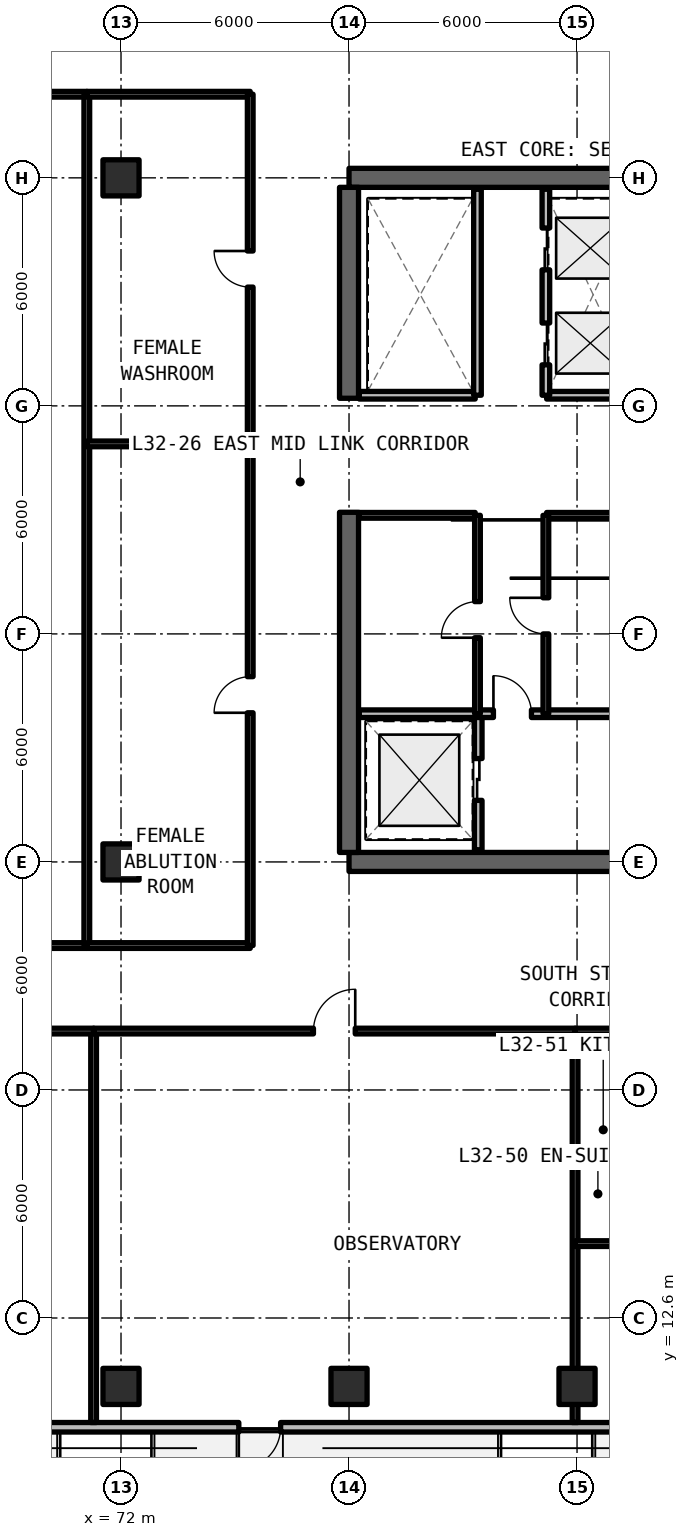
"""IFC4 building model, lengths in metres.
Left out: names, types, materials, properties, quantities, classifications, styles, units other than length and angle.
Written with IfcOpenShell. Run it as: python <this file> out.ifc"""

import sys

from ifc_helpers import new_model, si_unit, direction, frame, frame_2d, origin, origin_2d, place, context, subcontext, project, spatial, rectangle, extrude, element, fill, save


model = new_model("IFC4")
c1 = context("Model", 3, precision=1e-05, world=origin(), true_north=direction((0.0, 1.0)))
c2 = subcontext(c1, "Body", "Model", "MODEL_VIEW")
j1 = project(units=[si_unit("LENGTHUNIT", "METRE"), si_unit("PLANEANGLEUNIT", "RADIAN")], contexts=[c1])
p1 = place(None, origin())
s1 = spatial("IfcSite", under=j1, at=p1, CompositionType="ELEMENT")
p2 = place(p1, origin())
s2 = spatial("IfcBuilding", under=s1, at=p2, CompositionType="ELEMENT")
p3 = place(p2, frame((0.0, 0.0, 115.83)))
s3 = spatial("IfcBuildingStorey", under=s2, at=p3, CompositionType="ELEMENT", Elevation=115.83)
for number, where, z_axis, x_axis in (
    (1, (78.0, 24.6, 0.0), (0.0, 0.0, 1.0), (1.0, 0.0, 0.0)),
    (2, (90.0, 42.6, 0.0), (0.0, 0.0, 1.0), (-1.0, 0.0, 0.0)),
):
    element("IfcWall", number, at=place(p3, frame(where, z_axis=z_axis, x_axis=x_axis)), inside=s3, PredefinedType="SHEAR", context=c2, shape_type="SweptSolid", body=[
        extrude(rectangle(XDim=12.0, YDim=0.5, at=frame_2d((6.0, 0.0))), origin(), (0.0, 0.0, 1.0), 3.63),
    ])
p4 = place(p3, frame((78.0, 24.85, 0.0), z_axis=(0.0, 0.0, 1.0), x_axis=(0.0, 1.0, 0.0)))
e3 = element("IfcWall", 3, at=p4, inside=s3, PredefinedType="SHEAR", context=c2, shape_type="SweptSolid", body=[
    extrude(rectangle(XDim=8.95, YDim=0.5, at=frame_2d((4.475, 0.0))), origin(), (0.0, 0.0, 1.0), 3.63),
])
p5 = place(p3, frame((78.0, 36.8, 0.0), z_axis=(0.0, 0.0, 1.0), x_axis=(0.0, 1.0, 0.0)))
e4 = element("IfcWall", 4, at=p5, inside=s3, PredefinedType="SHEAR", context=c2, shape_type="SweptSolid", body=[
    extrude(rectangle(XDim=5.55, YDim=0.5, at=frame_2d((2.775, 0.0))), origin(), (0.0, 0.0, 1.0), 3.63),
])
for number, where, z_axis, x_axis in (
    (5, (72.0, 24.6, 0.0), (0.0, 0.0, 1.0), (1.0, 0.0, 0.0)),
    (6, (72.0, 42.6, 0.0), (0.0, 0.0, 1.0), (1.0, 0.0, 0.0)),
    (7, (72.0, 10.8, 0.0), (0.0, 0.0, 1.0), (1.0, 0.0, 0.0)),
    (8, (78.0, 10.8, 0.0), (0.0, 0.0, 1.0), (1.0, 0.0, 0.0)),
    (9, (84.0, 10.8, 0.0), (0.0, 0.0, 1.0), (1.0, 0.0, 0.0)),
):
    element("IfcColumn", number, at=place(p3, frame(where, z_axis=z_axis, x_axis=x_axis)), inside=s3, PredefinedType="COLUMN", context=c2, shape_type="SweptSolid", body=[
        extrude(rectangle(XDim=0.95, YDim=0.95, at=origin_2d()), origin(), (0.0, 0.0, 1.0), 3.63),
    ])
p6 = place(p3, frame((52.125, 9.725, 0.0), z_axis=(0.0, 0.0, 1.0), x_axis=(1.0, 0.0, 0.0)))
e10 = element("IfcWall", 10, at=p6, inside=s3, PredefinedType="SOLIDWALL", context=c2, shape_type="SweptSolid", body=[
    extrude(rectangle(XDim=44.023, YDim=0.25, at=frame_2d((22.012, 0.0))), origin(), (0.0, 0.0, 1.0), 3.41),
])
p7 = place(p6, frame((10.875, 0.0, 0.0)))
e11 = element("IfcOpeningElement", 11, at=p7, cuts=e10, PredefinedType="OPENING", context=c2, shape_type="SweptSolid", body=[
    extrude(rectangle(XDim=1.1, YDim=2.15, at=frame_2d((0.55, 1.075))), frame((0.0, 0.135, 0.0), z_axis=(0.0, -1.0, 0.0), x_axis=(1.0, 0.0, 0.0)), (0.0, 0.0, 1.0), 0.27),
])
p8 = place(p6, frame((22.975, 0.0, 0.0)))
e12 = element("IfcOpeningElement", 12, at=p8, cuts=e10, PredefinedType="OPENING", context=c2, shape_type="SweptSolid", body=[
    extrude(rectangle(XDim=1.1, YDim=2.15, at=frame_2d((0.55, 1.075))), frame((0.0, 0.135, 0.0), z_axis=(0.0, -1.0, 0.0), x_axis=(1.0, 0.0, 0.0)), (0.0, 0.0, 1.0), 0.27),
])
p9 = place(p6, frame((35.075, 0.0, 0.0)))
e13 = element("IfcOpeningElement", 13, at=p9, cuts=e10, PredefinedType="OPENING", context=c2, shape_type="SweptSolid", body=[
    extrude(rectangle(XDim=1.1, YDim=2.15, at=frame_2d((0.55, 1.075))), frame((0.0, 0.135, 0.0), z_axis=(0.0, -1.0, 0.0), x_axis=(1.0, 0.0, 0.0)), (0.0, 0.0, 1.0), 0.27),
])
p10 = place(p6, frame((2.703, 0.0, 0.78)))
e14 = element("IfcOpeningElement", 14, at=p10, cuts=e10, PredefinedType="OPENING", context=c2, shape_type="SweptSolid", body=[
    extrude(rectangle(XDim=2.0, YDim=1.66, at=frame_2d((1.0, 0.83))), frame((0.0, 0.135, 0.0), z_axis=(0.0, -1.0, 0.0), x_axis=(1.0, 0.0, 0.0)), (0.0, 0.0, 1.0), 0.27),
])
p11 = place(p6, frame((39.973, 0.0, 0.78)))
e15 = element("IfcOpeningElement", 15, at=p11, cuts=e10, PredefinedType="OPENING", context=c2, shape_type="SweptSolid", body=[
    extrude(rectangle(XDim=2.0, YDim=1.66, at=frame_2d((1.0, 0.83))), frame((0.0, 0.135, 0.0), z_axis=(0.0, -1.0, 0.0), x_axis=(1.0, 0.0, 0.0)), (0.0, 0.0, 1.0), 0.27),
])
p12 = place(p3, frame((81.4, 24.92, 0.0), z_axis=(0.0, 0.0, 1.0), x_axis=(0.0, 1.0, 0.0)))
e16 = element("IfcWall", 16, at=p12, inside=s3, PredefinedType="SOLIDWALL", context=c2, shape_type="SweptSolid", body=[
    extrude(rectangle(XDim=3.58, YDim=0.2, at=frame_2d((1.79, 0.0))), origin(), (0.0, 0.0, 1.0), 2.63),
])
p13 = place(p12, frame((1.3, 0.0, 0.0)))
e17 = element("IfcOpeningElement", 17, at=p13, cuts=e16, PredefinedType="OPENING", context=c2, shape_type="SweptSolid", body=[
    extrude(rectangle(XDim=1.1, YDim=2.2, at=frame_2d((0.55, 1.1))), frame((0.0, 0.11, 0.0), z_axis=(0.0, -1.0, 0.0), x_axis=(1.0, 0.0, 0.0)), (0.0, 0.0, 1.0), 0.22),
])
p14 = place(p3, frame((78.27, 28.5, 0.0), z_axis=(0.0, 0.0, 1.0), x_axis=(1.0, 0.0, 0.0)))
e18 = element("IfcWall", 18, at=p14, inside=s3, PredefinedType="SOLIDWALL", context=c2, shape_type="SweptSolid", body=[
    extrude(rectangle(XDim=7.51, YDim=0.2, at=frame_2d((3.755, 0.0))), origin(), (0.0, 0.0, 1.0), 2.63),
])
p15 = place(p14, frame((3.53, 0.0, 0.0)))
e19 = element("IfcOpeningElement", 19, at=p15, cuts=e18, PredefinedType="OPENING", context=c2, shape_type="SweptSolid", body=[
    extrude(rectangle(XDim=1.0, YDim=2.15, at=frame_2d((0.5, 1.075))), frame((0.0, 0.11, 0.0), z_axis=(0.0, -1.0, 0.0), x_axis=(1.0, 0.0, 0.0)), (0.0, 0.0, 1.0), 0.22),
])
p16 = place(p3, frame((83.2, 33.72, 0.0), z_axis=(0.0, 0.0, 1.0), x_axis=(1.0, 0.0, 0.0)))
e20 = element("IfcWall", 20, at=p16, inside=s3, PredefinedType="SOLIDWALL", context=c2, shape_type="SweptSolid", body=[
    extrude(rectangle(XDim=2.58, YDim=0.15, at=frame_2d((1.29, 0.0))), origin(), (0.0, 0.0, 1.0), 2.63),
])
p17 = place(p3, frame((83.18, 28.5, 0.0), z_axis=(0.0, 0.0, 1.0), x_axis=(0.0, 1.0, 0.0)))
e21 = element("IfcWall", 21, at=p17, inside=s3, PredefinedType="SOLIDWALL", context=c2, shape_type="SweptSolid", body=[
    extrude(rectangle(XDim=5.22, YDim=0.15, at=frame_2d((2.61, 0.0))), origin(), (0.0, 0.0, 1.0), 2.63),
])
p18 = place(p17, frame((2.1, 0.0, 0.0)))
e22 = element("IfcOpeningElement", 22, at=p18, cuts=e21, PredefinedType="OPENING", context=c2, shape_type="SweptSolid", body=[
    extrude(rectangle(XDim=0.95, YDim=2.15, at=frame_2d((0.475, 1.075))), frame((0.0, 0.085, 0.0), z_axis=(0.0, -1.0, 0.0), x_axis=(1.0, 0.0, 0.0)), (0.0, 0.0, 1.0), 0.17),
])
p19 = place(p3, frame((78.27, 33.72, 0.0), z_axis=(0.0, 0.0, 1.0), x_axis=(1.0, 0.0, 0.0)))
e23 = element("IfcWall", 23, at=p19, inside=s3, PredefinedType="SOLIDWALL", context=c2, shape_type="SweptSolid", body=[
    extrude(rectangle(XDim=3.05, YDim=0.15, at=frame_2d((1.525, 0.0))), origin(), (0.0, 0.0, 1.0), 2.63),
])
p20 = place(p3, frame((81.38, 28.5, 0.0), z_axis=(0.0, 0.0, 1.0), x_axis=(0.0, 1.0, 0.0)))
e24 = element("IfcWall", 24, at=p20, inside=s3, PredefinedType="SOLIDWALL", context=c2, shape_type="SweptSolid", body=[
    extrude(rectangle(XDim=5.22, YDim=0.15, at=frame_2d((2.61, 0.0))), origin(), (0.0, 0.0, 1.0), 2.63),
])
p21 = place(p20, frame((2.0, 0.0, 0.0)))
e25 = element("IfcOpeningElement", 25, at=p21, cuts=e24, PredefinedType="OPENING", context=c2, shape_type="SweptSolid", body=[
    extrude(rectangle(XDim=0.95, YDim=2.15, at=frame_2d((0.475, 1.075))), frame((0.0, 0.085, 0.0), z_axis=(0.0, -1.0, 0.0), x_axis=(1.0, 0.0, 0.0)), (0.0, 0.0, 1.0), 0.17),
])
p22 = place(p3, frame((83.2, 36.88, 0.0), z_axis=(0.0, 0.0, 1.0), x_axis=(1.0, 0.0, 0.0)))
e26 = element("IfcWall", 26, at=p22, inside=s3, PredefinedType="SOLIDWALL", context=c2, shape_type="SweptSolid", body=[
    extrude(rectangle(XDim=2.58, YDim=0.2, at=frame_2d((1.29, 0.0))), origin(), (0.0, 0.0, 1.0), 2.63),
])
p23 = place(p3, frame((83.18, 36.88, 0.0), z_axis=(0.0, 0.0, 1.0), x_axis=(0.0, 1.0, 0.0)))
e27 = element("IfcWall", 27, at=p23, inside=s3, PredefinedType="SOLIDWALL", context=c2, shape_type="SweptSolid", body=[
    extrude(rectangle(XDim=5.42, YDim=0.2, at=frame_2d((2.71, 0.0))), origin(), (0.0, 0.0, 1.0), 2.63),
])
p24 = place(p23, frame((0.8, 0.0, 0.0)))
e28 = element("IfcOpeningElement", 28, at=p24, cuts=e27, PredefinedType="OPENING", context=c2, shape_type="SweptSolid", body=[
    extrude(rectangle(XDim=1.1, YDim=2.2, at=frame_2d((0.55, 1.1))), frame((0.0, 0.11, 0.0), z_axis=(0.0, -1.0, 0.0), x_axis=(1.0, 0.0, 0.0)), (0.0, 0.0, 1.0), 0.22),
])
p25 = place(p23, frame((3.3, 0.0, 0.0)))
e29 = element("IfcOpeningElement", 29, at=p25, cuts=e27, PredefinedType="OPENING", context=c2, shape_type="SweptSolid", body=[
    extrude(rectangle(XDim=1.1, YDim=2.2, at=frame_2d((0.55, 1.1))), frame((0.0, 0.11, 0.0), z_axis=(0.0, -1.0, 0.0), x_axis=(1.0, 0.0, 0.0)), (0.0, 0.0, 1.0), 0.22),
])
p26 = place(p3, frame((78.27, 36.88, 0.0), z_axis=(0.0, 0.0, 1.0), x_axis=(1.0, 0.0, 0.0)))
e30 = element("IfcWall", 30, at=p26, inside=s3, PredefinedType="SOLIDWALL", context=c2, shape_type="SweptSolid", body=[
    extrude(rectangle(XDim=3.05, YDim=0.2, at=frame_2d((1.525, 0.0))), origin(), (0.0, 0.0, 1.0), 2.63),
])
p27 = place(p3, frame((81.38, 36.88, 0.0), z_axis=(0.0, 0.0, 1.0), x_axis=(0.0, 1.0, 0.0)))
e31 = element("IfcWall", 31, at=p27, inside=s3, PredefinedType="SOLIDWALL", context=c2, shape_type="SweptSolid", body=[
    extrude(rectangle(XDim=5.42, YDim=0.2, at=frame_2d((2.71, 0.0))), origin(), (0.0, 0.0, 1.0), 2.63),
])
p28 = place(p3, frame((42.1, 22.4, 0.0), z_axis=(0.0, 0.0, 1.0), x_axis=(1.0, 0.0, 0.0)))
e32 = element("IfcWall", 32, at=p28, inside=s3, PredefinedType="SOLIDWALL", context=c2, shape_type="SweptSolid", body=[
    extrude(rectangle(XDim=29.0, YDim=0.15, at=frame_2d((14.5, 0.0))), origin(), (0.0, 0.0, 1.0), 2.63),
])
p29 = place(p28, frame((13.8, 0.0, 0.0)))
e33 = element("IfcOpeningElement", 33, at=p29, cuts=e32, PredefinedType="OPENING", context=c2, shape_type="SweptSolid", body=[
    extrude(rectangle(XDim=1.4, YDim=2.15, at=frame_2d((0.7, 1.075))), frame((0.0, 0.085, 0.0), z_axis=(0.0, -1.0, 0.0), x_axis=(1.0, 0.0, 0.0)), (0.0, 0.0, 1.0), 0.17),
])
p30 = place(p3, frame((42.1, 44.8, 0.0), z_axis=(0.0, 0.0, 1.0), x_axis=(1.0, 0.0, 0.0)))
e34 = element("IfcWall", 34, at=p30, inside=s3, PredefinedType="SOLIDWALL", context=c2, shape_type="SweptSolid", body=[
    extrude(rectangle(XDim=29.0, YDim=0.15, at=frame_2d((14.5, 0.0))), origin(), (0.0, 0.0, 1.0), 2.63),
])
p31 = place(p3, frame((71.1, 22.4, 0.0), z_axis=(0.0, 0.0, 1.0), x_axis=(0.0, 1.0, 0.0)))
e35 = element("IfcWall", 35, at=p31, inside=s3, PredefinedType="SOLIDWALL", context=c2, shape_type="SweptSolid", body=[
    extrude(rectangle(XDim=22.4, YDim=0.15, at=frame_2d((11.2, 0.0))), origin(), (0.0, 0.0, 1.0), 2.63),
])
for number, where, z_axis, x_axis in (
    (36, (71.1, 22.4, 0.0), (0.0, 0.0, 1.0), (1.0, 0.0, 0.0)),
    (37, (71.1, 35.6, 0.0), (0.0, 0.0, 1.0), (1.0, 0.0, 0.0)),
):
    element("IfcWall", number, at=place(p3, frame(where, z_axis=z_axis, x_axis=x_axis)), inside=s3, PredefinedType="SOLIDWALL", context=c2, shape_type="SweptSolid", body=[
        extrude(rectangle(XDim=4.3, YDim=0.15, at=frame_2d((2.15, 0.0))), origin(), (0.0, 0.0, 1.0), 2.63),
    ])
p32 = place(p3, frame((75.4, 22.4, 0.0), z_axis=(0.0, 0.0, 1.0), x_axis=(0.0, 1.0, 0.0)))
e38 = element("IfcWall", 38, at=p32, inside=s3, PredefinedType="SOLIDWALL", context=c2, shape_type="SweptSolid", body=[
    extrude(rectangle(XDim=13.2, YDim=0.15, at=frame_2d((6.6, 0.0))), origin(), (0.0, 0.0, 1.0), 2.63),
])
p33 = place(p32, frame((6.125, 0.0, 0.0)))
e39 = element("IfcOpeningElement", 39, at=p33, cuts=e38, PredefinedType="OPENING", context=c2, shape_type="SweptSolid", body=[
    extrude(rectangle(XDim=0.95, YDim=2.15, at=frame_2d((0.475, 1.075))), frame((0.0, 0.085, 0.0), z_axis=(0.0, -1.0, 0.0), x_axis=(1.0, 0.0, 0.0)), (0.0, 0.0, 1.0), 0.17),
])
p34 = place(p3, frame((71.1, 44.8, 0.0), z_axis=(0.0, 0.0, 1.0), x_axis=(1.0, 0.0, 0.0)))
e40 = element("IfcWall", 40, at=p34, inside=s3, PredefinedType="SOLIDWALL", context=c2, shape_type="SweptSolid", body=[
    extrude(rectangle(XDim=4.3, YDim=0.15, at=frame_2d((2.15, 0.0))), origin(), (0.0, 0.0, 1.0), 2.63),
])
p35 = place(p3, frame((75.4, 35.6, 0.0), z_axis=(0.0, 0.0, 1.0), x_axis=(0.0, 1.0, 0.0)))
e41 = element("IfcWall", 41, at=p35, inside=s3, PredefinedType="SOLIDWALL", context=c2, shape_type="SweptSolid", body=[
    extrude(rectangle(XDim=9.2, YDim=0.15, at=frame_2d((4.6, 0.0))), origin(), (0.0, 0.0, 1.0), 2.63),
])
p36 = place(p35, frame((4.125, 0.0, 0.0)))
e42 = element("IfcOpeningElement", 42, at=p36, cuts=e41, PredefinedType="OPENING", context=c2, shape_type="SweptSolid", body=[
    extrude(rectangle(XDim=0.95, YDim=2.15, at=frame_2d((0.475, 1.075))), frame((0.0, 0.085, 0.0), z_axis=(0.0, -1.0, 0.0), x_axis=(1.0, 0.0, 0.0)), (0.0, 0.0, 1.0), 0.17),
])
p37 = place(p3, frame((71.279, 9.85, 0.0), z_axis=(0.0, 0.0, 1.0), x_axis=(0.0, 1.0, 0.0)))
e43 = element("IfcWall", 43, at=p37, inside=s3, PredefinedType="SOLIDWALL", context=c2, shape_type="SweptSolid", body=[
    extrude(rectangle(XDim=10.3, YDim=0.15, at=frame_2d((5.15, 0.0))), origin(), (0.0, 0.0, 1.0), 2.63),
])
p38 = place(p3, frame((59.536, 20.15, 0.0), z_axis=(0.0, 0.0, 1.0), x_axis=(1.0, 0.0, 0.0)))
e44 = element("IfcWall", 44, at=p38, inside=s3, PredefinedType="SOLIDWALL", context=c2, shape_type="SweptSolid", body=[
    extrude(rectangle(XDim=11.742, YDim=0.15, at=frame_2d((5.871, 0.0))), origin(), (0.0, 0.0, 1.0), 2.63),
])
p39 = place(p38, frame((5.321, 0.0, 0.0)))
e45 = element("IfcOpeningElement", 45, at=p39, cuts=e44, PredefinedType="OPENING", context=c2, shape_type="SweptSolid", body=[
    extrude(rectangle(XDim=1.1, YDim=2.15, at=frame_2d((0.55, 1.075))), frame((0.0, 0.085, 0.0), z_axis=(0.0, -1.0, 0.0), x_axis=(1.0, 0.0, 0.0)), (0.0, 0.0, 1.0), 0.17),
])
p40 = place(p3, frame((83.948, 9.85, 0.0), z_axis=(0.0, 0.0, 1.0), x_axis=(0.0, 1.0, 0.0)))
e46 = element("IfcWall", 46, at=p40, inside=s3, PredefinedType="SOLIDWALL", context=c2, shape_type="SweptSolid", body=[
    extrude(rectangle(XDim=10.3, YDim=0.15, at=frame_2d((5.15, 0.0))), origin(), (0.0, 0.0, 1.0), 2.63),
])
p41 = place(p3, frame((71.279, 20.15, 0.0), z_axis=(0.0, 0.0, 1.0), x_axis=(1.0, 0.0, 0.0)))
e47 = element("IfcWall", 47, at=p41, inside=s3, PredefinedType="SOLIDWALL", context=c2, shape_type="SweptSolid", body=[
    extrude(rectangle(XDim=12.67, YDim=0.15, at=frame_2d((6.335, 0.0))), origin(), (0.0, 0.0, 1.0), 2.63),
])
p42 = place(p41, frame((5.785, 0.0, 0.0)))
e48 = element("IfcOpeningElement", 48, at=p42, cuts=e47, PredefinedType="OPENING", context=c2, shape_type="SweptSolid", body=[
    extrude(rectangle(XDim=1.1, YDim=2.15, at=frame_2d((0.55, 1.075))), frame((0.0, 0.085, 0.0), z_axis=(0.0, -1.0, 0.0), x_axis=(1.0, 0.0, 0.0)), (0.0, 0.0, 1.0), 0.17),
])
p43 = place(p3, frame((83.948, 16.85, 0.0), z_axis=(0.0, 0.0, 1.0), x_axis=(1.0, 0.0, 0.0)))
e49 = element("IfcWall", 49, at=p43, inside=s3, PredefinedType="PARTITIONING", context=c2, shape_type="SweptSolid", body=[
    extrude(rectangle(XDim=2.35, YDim=0.15, at=frame_2d((1.175, 0.0))), origin(), (0.0, 0.0, 1.0), 2.63),
])
p44 = place(p3, frame((83.948, 14.557, 0.0), z_axis=(0.0, 0.0, 1.0), x_axis=(1.0, 0.0, 0.0)))
e50 = element("IfcWall", 50, at=p44, inside=s3, PredefinedType="PARTITIONING", context=c2, shape_type="SweptSolid", body=[
    extrude(rectangle(XDim=12.052, YDim=0.15, at=frame_2d((6.026, 0.0))), origin(), (0.0, 0.0, 1.0), 2.63),
])
p45 = place(p44, frame((3.883, 0.0, 0.0)))
e51 = element("IfcOpeningElement", 51, at=p45, cuts=e50, PredefinedType="OPENING", context=c2, shape_type="SweptSolid", body=[
    extrude(rectangle(XDim=0.85, YDim=2.1, at=frame_2d((0.425, 1.05))), frame((0.0, 0.085, 0.0), z_axis=(0.0, -1.0, 0.0), x_axis=(1.0, 0.0, 0.0)), (0.0, 0.0, 1.0), 0.17),
])
p46 = place(p44, frame((8.734, 0.0, 0.0)))
e52 = element("IfcOpeningElement", 52, at=p46, cuts=e50, PredefinedType="OPENING", context=c2, shape_type="SweptSolid", body=[
    extrude(rectangle(XDim=0.85, YDim=2.1, at=frame_2d((0.425, 1.05))), frame((0.0, 0.085, 0.0), z_axis=(0.0, -1.0, 0.0), x_axis=(1.0, 0.0, 0.0)), (0.0, 0.0, 1.0), 0.17),
])
p47 = place(p3, frame((83.948, 20.15, 0.0), z_axis=(0.0, 0.0, 1.0), x_axis=(1.0, 0.0, 0.0)))
e53 = element("IfcWall", 53, at=p47, inside=s3, PredefinedType="SOLIDWALL", context=c2, shape_type="SweptSolid", body=[
    extrude(rectangle(XDim=12.052, YDim=0.15, at=frame_2d((6.026, 0.0))), origin(), (0.0, 0.0, 1.0), 2.63),
])
p48 = place(p47, frame((6.916, 0.0, 0.0)))
e54 = element("IfcOpeningElement", 54, at=p48, cuts=e53, PredefinedType="OPENING", context=c2, shape_type="SweptSolid", body=[
    extrude(rectangle(XDim=0.95, YDim=2.15, at=frame_2d((0.475, 1.075))), frame((0.0, 0.085, 0.0), z_axis=(0.0, -1.0, 0.0), x_axis=(1.0, 0.0, 0.0)), (0.0, 0.0, 1.0), 0.17),
])
p49 = place(p8, frame((1.1, 0.0, 0.0), z_axis=(0.0, 0.0, 1.0), x_axis=(-1.0, 0.0, 0.0)))
e55 = element("IfcDoor", 55, at=p49, inside=s3, OperationType="SINGLE_SWING_RIGHT", PredefinedType="DOOR", context=c2, shape_type="SweptSolid", body=[
    extrude(rectangle(XDim=1.1, YDim=2.15, at=frame_2d((0.55, 1.075))), frame((0.0, 0.025, 0.0), z_axis=(0.0, -1.0, 0.0), x_axis=(1.0, 0.0, 0.0)), (0.0, 0.0, 1.0), 0.05),
])
fill(e12, e55)
p50 = place(p13, origin())
e56 = element("IfcDoor", 56, at=p50, inside=s3, OperationType="SLIDING_TO_LEFT", PredefinedType="DOOR", context=c2, shape_type="SweptSolid", body=[
    extrude(rectangle(XDim=1.1, YDim=2.2, at=frame_2d((0.55, 1.1))), frame((0.0, 0.025, 0.0), z_axis=(0.0, -1.0, 0.0), x_axis=(1.0, 0.0, 0.0)), (0.0, 0.0, 1.0), 0.05),
])
fill(e17, e56)
p51 = place(p15, origin())
e57 = element("IfcDoor", 57, at=p51, inside=s3, OperationType="SINGLE_SWING_LEFT", PredefinedType="DOOR", context=c2, shape_type="SweptSolid", body=[
    extrude(rectangle(XDim=1.0, YDim=2.15, at=frame_2d((0.5, 1.075))), frame((0.0, 0.025, 0.0), z_axis=(0.0, -1.0, 0.0), x_axis=(1.0, 0.0, 0.0)), (0.0, 0.0, 1.0), 0.05),
])
fill(e19, e57)
p52 = place(p18, origin())
e58 = element("IfcDoor", 58, at=p52, inside=s3, OperationType="SINGLE_SWING_RIGHT", PredefinedType="DOOR", context=c2, shape_type="SweptSolid", body=[
    extrude(rectangle(XDim=0.95, YDim=2.15, at=frame_2d((0.475, 1.075))), frame((0.0, 0.025, 0.0), z_axis=(0.0, -1.0, 0.0), x_axis=(1.0, 0.0, 0.0)), (0.0, 0.0, 1.0), 0.05),
])
fill(e22, e58)
p53 = place(p21, origin())
e59 = element("IfcDoor", 59, at=p53, inside=s3, OperationType="SINGLE_SWING_LEFT", PredefinedType="DOOR", context=c2, shape_type="SweptSolid", body=[
    extrude(rectangle(XDim=0.95, YDim=2.15, at=frame_2d((0.475, 1.075))), frame((0.0, 0.025, 0.0), z_axis=(0.0, -1.0, 0.0), x_axis=(1.0, 0.0, 0.0)), (0.0, 0.0, 1.0), 0.05),
])
fill(e25, e59)
p54 = place(p24, origin())
e60 = element("IfcDoor", 60, at=p54, inside=s3, OperationType="SLIDING_TO_LEFT", PredefinedType="DOOR", context=c2, shape_type="SweptSolid", body=[
    extrude(rectangle(XDim=1.1, YDim=2.2, at=frame_2d((0.55, 1.1))), frame((0.0, 0.025, 0.0), z_axis=(0.0, -1.0, 0.0), x_axis=(1.0, 0.0, 0.0)), (0.0, 0.0, 1.0), 0.05),
])
fill(e28, e60)
p55 = place(p25, origin())
e61 = element("IfcDoor", 61, at=p55, inside=s3, OperationType="SLIDING_TO_RIGHT", PredefinedType="DOOR", context=c2, shape_type="SweptSolid", body=[
    extrude(rectangle(XDim=1.1, YDim=2.2, at=frame_2d((0.55, 1.1))), frame((0.0, 0.025, 0.0), z_axis=(0.0, -1.0, 0.0), x_axis=(1.0, 0.0, 0.0)), (0.0, 0.0, 1.0), 0.05),
])
fill(e29, e61)
p56 = place(p33, origin())
e62 = element("IfcDoor", 62, at=p56, inside=s3, OperationType="SINGLE_SWING_LEFT", PredefinedType="DOOR", context=c2, shape_type="SweptSolid", body=[
    extrude(rectangle(XDim=0.95, YDim=2.15, at=frame_2d((0.475, 1.075))), frame((0.0, 0.025, 0.0), z_axis=(0.0, -1.0, 0.0), x_axis=(1.0, 0.0, 0.0)), (0.0, 0.0, 1.0), 0.05),
])
fill(e39, e62)
p57 = place(p36, origin())
e63 = element("IfcDoor", 63, at=p57, inside=s3, OperationType="SINGLE_SWING_RIGHT", PredefinedType="DOOR", context=c2, shape_type="SweptSolid", body=[
    extrude(rectangle(XDim=0.95, YDim=2.15, at=frame_2d((0.475, 1.075))), frame((0.0, 0.025, 0.0), z_axis=(0.0, -1.0, 0.0), x_axis=(1.0, 0.0, 0.0)), (0.0, 0.0, 1.0), 0.05),
])
fill(e42, e63)
p58 = place(p42, origin())
e64 = element("IfcDoor", 64, at=p58, inside=s3, OperationType="SINGLE_SWING_RIGHT", PredefinedType="DOOR", context=c2, shape_type="SweptSolid", body=[
    extrude(rectangle(XDim=1.1, YDim=2.15, at=frame_2d((0.55, 1.075))), frame((0.0, 0.025, 0.0), z_axis=(0.0, -1.0, 0.0), x_axis=(1.0, 0.0, 0.0)), (0.0, 0.0, 1.0), 0.05),
])
fill(e48, e64)
save(model, sys.argv[1])
